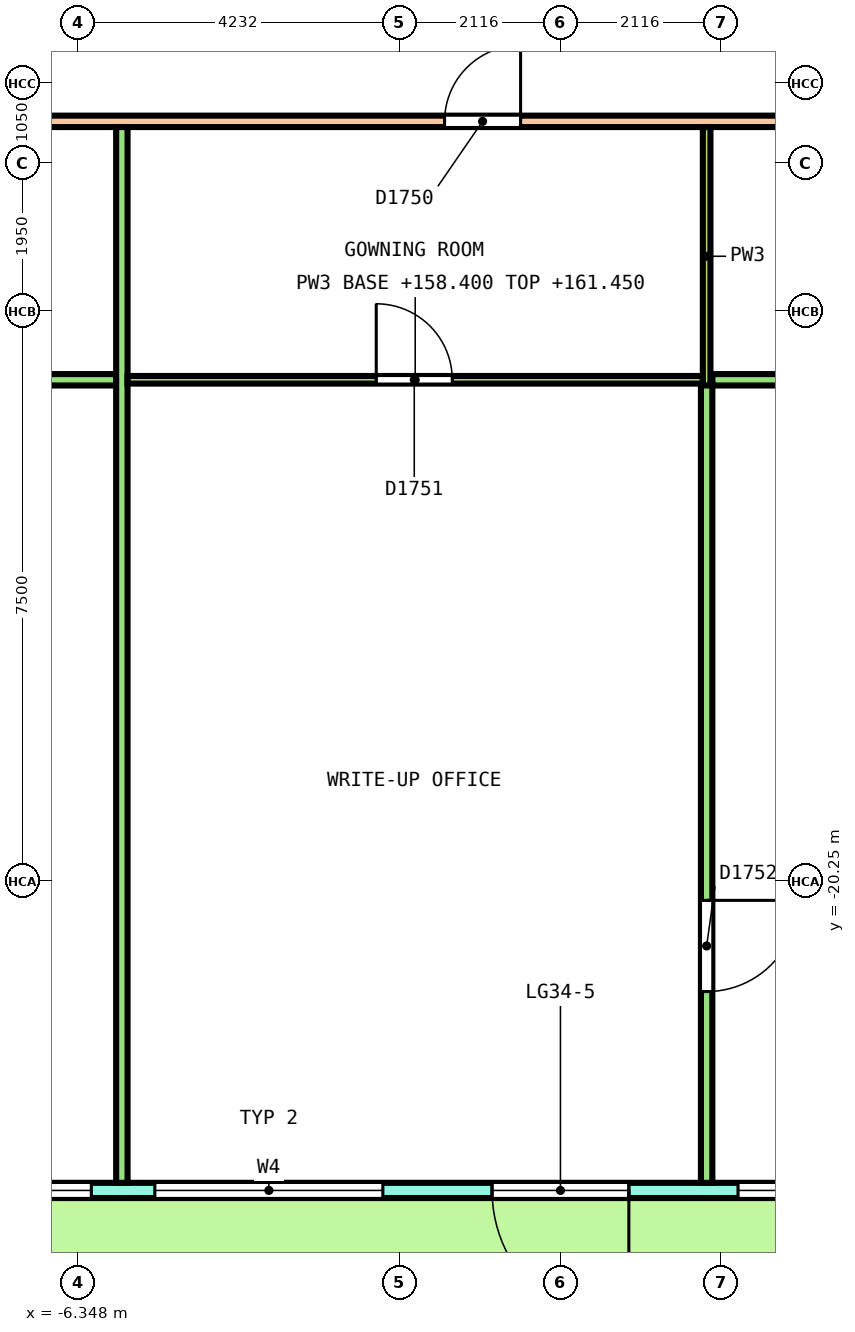
"""IFC4 building model, lengths in metres.
Left out: names, types, materials, properties, quantities, classifications, styles, units other than length and angle.
Written with IfcOpenShell. Run it as: python <this file> out.ifc"""

import sys

from ifc_helpers import new_model, si_unit, direction, frame, frame_2d, origin, place, context, subcontext, project, spatial, polyline, rectangle, outline, extrude, element, fill, save


model = new_model("IFC4")
c1 = context("Model", 3, precision=1e-05, world=origin(), true_north=direction((0.0, 1.0)))
c2 = subcontext(c1, "Body", "Model", "MODEL_VIEW")
j1 = project(units=[si_unit("LENGTHUNIT", "METRE"), si_unit("PLANEANGLEUNIT", "RADIAN")], contexts=[c1])
p1 = place(None, origin())
s1 = spatial("IfcSite", under=j1, at=p1, CompositionType="ELEMENT")
p2 = place(p1, origin())
s2 = spatial("IfcBuilding", under=s1, at=p2, CompositionType="ELEMENT")
p3 = place(p2, frame((0.0, 0.0, 158.4)))
s3 = spatial("IfcBuildingStorey", under=s2, at=p3, CompositionType="ELEMENT", Elevation=158.4)
p4 = place(p3, frame((-9.59, -24.315, 0.0), z_axis=(0.0, 0.0, 1.0), x_axis=(1.0, 0.0, 0.0)))
e1 = element("IfcWall", 1, at=p4, inside=s3, PredefinedType="SOLIDWALL", context=c2, shape_type="SweptSolid", body=[
    extrude(outline(polyline([(-0.027, -0.1), (0.985, -0.1), (1.998, -0.1), (3.01, -0.1), (4.022, -0.1), (5.035, -0.1), (6.047, -0.1), (7.059, -0.1), (8.072, -0.1), (9.084, -0.1), (10.096, -0.1), (11.109, -0.1), (12.121, -0.1), (13.133, -0.1), (14.146, -0.1), (15.158, -0.1), (16.17, -0.1), (17.182, -0.1), (18.195, -0.1), (19.207, -0.1), (19.153, 0.1), (18.147, 0.1), (17.14, 0.1), (16.133, 0.1), (15.127, 0.1), (14.12, 0.1), (13.113, 0.1), (12.107, 0.1), (11.1, 0.1), (10.094, 0.1), (9.087, 0.1), (8.08, 0.1), (7.073, 0.1), (6.067, 0.1), (5.06, 0.1), (4.053, 0.1), (3.047, 0.1), (2.04, 0.1), (1.033, 0.1), (0.027, 0.1), (-0.027, -0.1)])), origin(), (0.0, 0.0, 1.0), 4.1),
])
p5 = place(p4, frame((0.418, 0.0, 0.1)))
e2 = element("IfcOpeningElement", 2, at=p5, cuts=e1, PredefinedType="OPENING", context=c2, shape_type="SweptSolid", body=[
    extrude(rectangle(XDim=3.0, YDim=2.9, at=frame_2d((1.5, 1.45))), frame((0.0, 0.11, 0.0), z_axis=(0.0, -1.0, 0.0), x_axis=(1.0, 0.0, 0.0)), (0.0, 0.0, 1.0), 0.22),
])
p6 = place(p4, frame((4.254, 0.0, 0.1)))
e3 = element("IfcOpeningElement", 3, at=p6, cuts=e1, PredefinedType="OPENING", context=c2, shape_type="SweptSolid", body=[
    extrude(rectangle(XDim=3.0, YDim=2.9, at=frame_2d((1.5, 1.45))), frame((0.0, 0.11, 0.0), z_axis=(0.0, -1.0, 0.0), x_axis=(1.0, 0.0, 0.0)), (0.0, 0.0, 1.0), 0.22),
])
p7 = place(p4, frame((8.69, 0.0, 0.0)))
e4 = element("IfcOpeningElement", 4, at=p7, cuts=e1, PredefinedType="OPENING", context=c2, shape_type="SweptSolid", body=[
    extrude(rectangle(XDim=1.8, YDim=2.4, at=frame_2d((0.9, 1.2))), frame((0.0, 0.11, 0.0), z_axis=(0.0, -1.0, 0.0), x_axis=(1.0, 0.0, 0.0)), (0.0, 0.0, 1.0), 0.22),
])
p8 = place(p4, frame((8.69, 0.0, 2.55)))
e5 = element("IfcOpeningElement", 5, at=p8, cuts=e1, PredefinedType="OPENING", context=c2, shape_type="SweptSolid", body=[
    extrude(rectangle(XDim=1.8, YDim=0.45, at=frame_2d((0.9, 0.225))), frame((0.0, 0.11, 0.0), z_axis=(0.0, -1.0, 0.0), x_axis=(1.0, 0.0, 0.0)), (0.0, 0.0, 1.0), 0.22),
])
p9 = place(p4, frame((11.926, 0.0, 0.1)))
e6 = element("IfcOpeningElement", 6, at=p9, cuts=e1, PredefinedType="OPENING", context=c2, shape_type="SweptSolid", body=[
    extrude(rectangle(XDim=3.0, YDim=2.9, at=frame_2d((1.5, 1.45))), frame((0.0, 0.11, 0.0), z_axis=(0.0, -1.0, 0.0), x_axis=(1.0, 0.0, 0.0)), (0.0, 0.0, 1.0), 0.22),
])
p10 = place(p4, frame((15.762, 0.0, 0.1)))
e7 = element("IfcOpeningElement", 7, at=p10, cuts=e1, PredefinedType="OPENING", context=c2, shape_type="SweptSolid", body=[
    extrude(rectangle(XDim=3.0, YDim=2.9, at=frame_2d((1.5, 1.45))), frame((0.0, 0.11, 0.0), z_axis=(0.0, -1.0, 0.0), x_axis=(1.0, 0.0, 0.0)), (0.0, 0.0, 1.0), 0.22),
])
p11 = place(p3, frame((-15.3, -10.25, 0.0), z_axis=(0.0, 0.0, 1.0), x_axis=(1.0, 0.0, 0.0)))
e8 = element("IfcWall", 8, at=p11, inside=s3, PredefinedType="PARTITIONING", context=c2, shape_type="SweptSolid", body=[
    extrude(rectangle(XDim=30.6, YDim=0.15, at=frame_2d((15.3, 0.0))), origin(), (0.0, 0.0, 1.0), 3.05),
])
p12 = place(p11, frame((0.816, 0.0, 0.0)))
e9 = element("IfcOpeningElement", 9, at=p12, cuts=e8, PredefinedType="OPENING", context=c2, shape_type="SweptSolid", body=[
    extrude(rectangle(XDim=1.0, YDim=2.1, at=frame_2d((0.5, 1.05))), frame((0.0, 0.085, 0.0), z_axis=(0.0, -1.0, 0.0), x_axis=(1.0, 0.0, 0.0)), (0.0, 0.0, 1.0), 0.17),
])
p13 = place(p11, frame((4.32, 0.0, 0.0)))
e10 = element("IfcOpeningElement", 10, at=p13, cuts=e8, PredefinedType="OPENING", context=c2, shape_type="SweptSolid", body=[
    extrude(rectangle(XDim=1.0, YDim=2.1, at=frame_2d((0.5, 1.05))), frame((0.0, 0.085, 0.0), z_axis=(0.0, -1.0, 0.0), x_axis=(1.0, 0.0, 0.0)), (0.0, 0.0, 1.0), 0.17),
])
p14 = place(p11, frame((13.776, 0.0, 0.0)))
e11 = element("IfcOpeningElement", 11, at=p14, cuts=e8, PredefinedType="OPENING", context=c2, shape_type="SweptSolid", body=[
    extrude(rectangle(XDim=1.0, YDim=2.1, at=frame_2d((0.5, 1.05))), frame((0.0, 0.085, 0.0), z_axis=(0.0, -1.0, 0.0), x_axis=(1.0, 0.0, 0.0)), (0.0, 0.0, 1.0), 0.17),
])
p15 = place(p11, frame((26.218, 0.0, 0.0)))
e12 = element("IfcOpeningElement", 12, at=p15, cuts=e8, PredefinedType="OPENING", context=c2, shape_type="SweptSolid", body=[
    extrude(rectangle(XDim=1.2, YDim=2.1, at=frame_2d((0.6, 1.05))), frame((0.0, 0.085, 0.0), z_axis=(0.0, -1.0, 0.0), x_axis=(1.0, 0.0, 0.0)), (0.0, 0.0, 1.0), 0.17),
])
p16 = place(p3, frame((-18.675, -13.65, 0.0), z_axis=(0.0, 0.0, 1.0), x_axis=(1.0, 0.0, 0.0)))
e13 = element("IfcWall", 13, at=p16, inside=s3, PredefinedType="PARTITIONING", context=c2, shape_type="SweptSolid", body=[
    extrude(rectangle(XDim=12.83, YDim=0.15, at=frame_2d((6.415, 0.0))), origin(), (0.0, 0.0, 1.0), 3.05),
])
p17 = place(p16, frame((3.6, 0.0, 0.0)))
e14 = element("IfcOpeningElement", 14, at=p17, cuts=e13, PredefinedType="OPENING", context=c2, shape_type="SweptSolid", body=[
    extrude(rectangle(XDim=1.0, YDim=2.1, at=frame_2d((0.5, 1.05))), frame((0.0, 0.085, 0.0), z_axis=(0.0, -1.0, 0.0), x_axis=(1.0, 0.0, 0.0)), (0.0, 0.0, 1.0), 0.17),
])
p18 = place(p16, frame((10.118, 0.0, 0.0)))
e15 = element("IfcOpeningElement", 15, at=p18, cuts=e13, PredefinedType="OPENING", context=c2, shape_type="SweptSolid", body=[
    extrude(rectangle(XDim=1.2, YDim=2.1, at=frame_2d((0.6, 1.05))), frame((0.0, 0.085, 0.0), z_axis=(0.0, -1.0, 0.0), x_axis=(1.0, 0.0, 0.0)), (0.0, 0.0, 1.0), 0.17),
])
p19 = place(p3, frame((1.998, -13.65, 0.0), z_axis=(0.0, 0.0, 1.0), x_axis=(1.0, 0.0, 0.0)))
e16 = element("IfcWall", 16, at=p19, inside=s3, PredefinedType="PARTITIONING", context=c2, shape_type="SweptSolid", body=[
    extrude(rectangle(XDim=16.827, YDim=0.15, at=frame_2d((8.413, 0.0))), origin(), (0.0, 0.0, 1.0), 3.05),
])
p20 = place(p3, frame((-5.77, -24.215, 0.0), z_axis=(0.0, 0.0, 1.0), x_axis=(0.0, 1.0, 0.0)))
e17 = element("IfcWall", 17, at=p20, inside=s3, PredefinedType="PARTITIONING", context=c2, shape_type="SweptSolid", body=[
    extrude(rectangle(XDim=13.89, YDim=0.15, at=frame_2d((6.945, 0.0))), origin(), (0.0, 0.0, 1.0), 3.05),
])
p21 = place(p3, frame((1.923, -24.215, 0.0), z_axis=(0.0, 0.0, 1.0), x_axis=(0.0, 1.0, 0.0)))
e18 = element("IfcWall", 18, at=p21, inside=s3, PredefinedType="PARTITIONING", context=c2, shape_type="SweptSolid", body=[
    extrude(rectangle(XDim=10.515, YDim=0.15, at=frame_2d((5.257, 0.0))), origin(), (0.0, 0.0, 1.0), 3.05),
])
p22 = place(p21, frame((2.516, 0.0, 0.0)))
e19 = element("IfcOpeningElement", 19, at=p22, cuts=e18, PredefinedType="OPENING", context=c2, shape_type="SweptSolid", body=[
    extrude(rectangle(XDim=1.2, YDim=2.1, at=frame_2d((0.6, 1.05))), frame((0.0, 0.085, 0.0), z_axis=(0.0, -1.0, 0.0), x_axis=(1.0, 0.0, 0.0)), (0.0, 0.0, 1.0), 0.17),
])
p23 = place(p3, frame((-5.695, -13.65, 0.0), z_axis=(0.0, 0.0, 1.0), x_axis=(1.0, 0.0, 0.0)))
e20 = element("IfcWall", 20, at=p23, inside=s3, PredefinedType="PARTITIONING", context=c2, shape_type="SweptSolid", body=[
    extrude(rectangle(XDim=7.568, YDim=0.1, at=frame_2d((3.784, 0.0))), origin(), (0.0, 0.0, 1.0), 3.05),
])
p24 = place(p23, frame((3.272, 0.0, 0.0)))
e21 = element("IfcOpeningElement", 21, at=p24, cuts=e20, PredefinedType="OPENING", context=c2, shape_type="SweptSolid", body=[
    extrude(rectangle(XDim=1.0, YDim=2.1, at=frame_2d((0.5, 1.05))), frame((0.0, 0.06, 0.0), z_axis=(0.0, -1.0, 0.0), x_axis=(1.0, 0.0, 0.0)), (0.0, 0.0, 1.0), 0.12),
])
p25 = place(p3, frame((1.923, -13.725, 0.0), z_axis=(0.0, 0.0, 1.0), x_axis=(0.0, 1.0, 0.0)))
e22 = element("IfcWall", 22, at=p25, inside=s3, PredefinedType="PARTITIONING", context=c2, shape_type="SweptSolid", body=[
    extrude(rectangle(XDim=3.4, YDim=0.1, at=frame_2d((1.7, 0.0))), origin(), (0.0, 0.0, 1.0), 4.1),
])
p26 = place(p5, origin())
e23 = element("IfcWindow", 23, at=p26, inside=s3, PartitioningType="SINGLE_PANEL", PredefinedType="WINDOW", context=c2, shape_type="SweptSolid", body=[
    extrude(rectangle(XDim=3.0, YDim=2.9, at=frame_2d((1.5, 1.45))), frame((0.0, 0.03, 0.0), z_axis=(0.0, -1.0, 0.0), x_axis=(1.0, 0.0, 0.0)), (0.0, 0.0, 1.0), 0.06),
])
fill(e2, e23)
p27 = place(p6, origin())
e24 = element("IfcWindow", 24, at=p27, inside=s3, PartitioningType="SINGLE_PANEL", PredefinedType="WINDOW", context=c2, shape_type="SweptSolid", body=[
    extrude(rectangle(XDim=3.0, YDim=2.9, at=frame_2d((1.5, 1.45))), frame((0.0, 0.03, 0.0), z_axis=(0.0, -1.0, 0.0), x_axis=(1.0, 0.0, 0.0)), (0.0, 0.0, 1.0), 0.06),
])
fill(e3, e24)
p28 = place(p7, origin())
e25 = element("IfcDoor", 25, at=p28, inside=s3, OperationType="DOUBLE_DOOR_SINGLE_SWING", PredefinedType="DOOR", context=c2, shape_type="SweptSolid", body=[
    extrude(rectangle(XDim=1.8, YDim=2.4, at=frame_2d((0.9, 1.2))), frame((0.0, 0.025, 0.0), z_axis=(0.0, -1.0, 0.0), x_axis=(1.0, 0.0, 0.0)), (0.0, 0.0, 1.0), 0.05),
])
fill(e4, e25)
p29 = place(p8, origin())
e26 = element("IfcWindow", 26, at=p29, inside=s3, PartitioningType="SINGLE_PANEL", PredefinedType="WINDOW", context=c2, shape_type="SweptSolid", body=[
    extrude(rectangle(XDim=1.8, YDim=0.45, at=frame_2d((0.9, 0.225))), frame((0.0, 0.03, 0.0), z_axis=(0.0, -1.0, 0.0), x_axis=(1.0, 0.0, 0.0)), (0.0, 0.0, 1.0), 0.06),
])
fill(e5, e26)
p30 = place(p9, origin())
e27 = element("IfcWindow", 27, at=p30, inside=s3, PartitioningType="SINGLE_PANEL", PredefinedType="WINDOW", context=c2, shape_type="SweptSolid", body=[
    extrude(rectangle(XDim=3.0, YDim=2.9, at=frame_2d((1.5, 1.45))), frame((0.0, 0.03, 0.0), z_axis=(0.0, -1.0, 0.0), x_axis=(1.0, 0.0, 0.0)), (0.0, 0.0, 1.0), 0.06),
])
fill(e6, e27)
p31 = place(p14, origin())
e28 = element("IfcDoor", 28, at=p31, inside=s3, OperationType="SINGLE_SWING_RIGHT", PredefinedType="DOOR", context=c2, shape_type="SweptSolid", body=[
    extrude(rectangle(XDim=1.0, YDim=2.1, at=frame_2d((0.5, 1.05))), frame((0.0, 0.025, 0.0), z_axis=(0.0, -1.0, 0.0), x_axis=(1.0, 0.0, 0.0)), (0.0, 0.0, 1.0), 0.05),
])
fill(e11, e28)
p32 = place(p24, origin())
e29 = element("IfcDoor", 29, at=p32, inside=s3, OperationType="SINGLE_SWING_RIGHT", PredefinedType="DOOR", context=c2, shape_type="SweptSolid", body=[
    extrude(rectangle(XDim=1.0, YDim=2.1, at=frame_2d((0.5, 1.05))), frame((0.0, 0.025, 0.0), z_axis=(0.0, -1.0, 0.0), x_axis=(1.0, 0.0, 0.0)), (0.0, 0.0, 1.0), 0.05),
])
fill(e21, e29)
p33 = place(p22, origin())
e30 = element("IfcDoor", 30, at=p33, inside=s3, OperationType="DOUBLE_DOOR_SINGLE_SWING", PredefinedType="DOOR", context=c2, shape_type="SweptSolid", body=[
    extrude(rectangle(XDim=1.2, YDim=2.1, at=frame_2d((0.6, 1.05))), frame((0.0, 0.025, 0.0), z_axis=(0.0, -1.0, 0.0), x_axis=(1.0, 0.0, 0.0)), (0.0, 0.0, 1.0), 0.05),
])
fill(e19, e30)
save(model, sys.argv[1])
